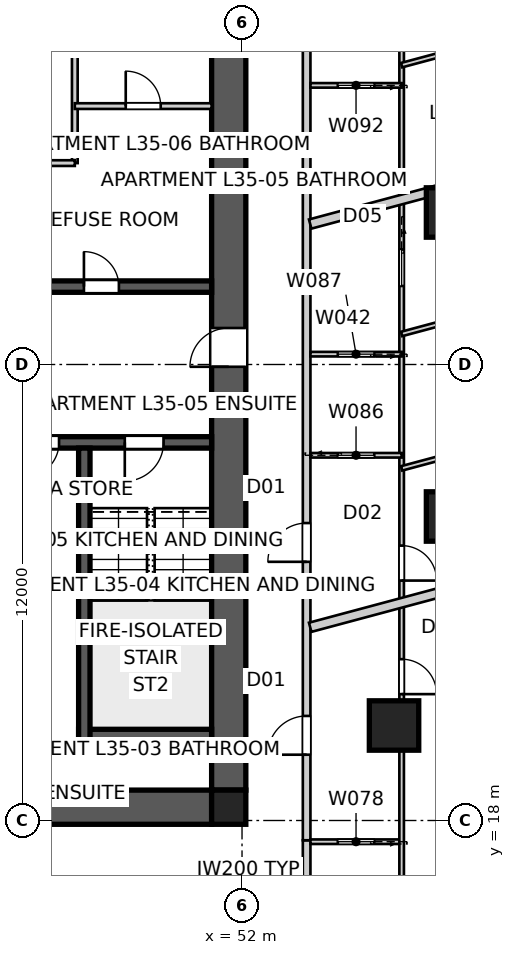
"""IFC4 building model, lengths in metres.
Left out: names, types, materials, properties, quantities, classifications, styles, units other than length and angle.
Written with IfcOpenShell. Run it as: python <this file> out.ifc"""

import sys

from ifc_helpers import new_model, si_unit, direction, frame, frame_2d, origin, origin_2d, place, context, subcontext, project, spatial, polyline, rectangle, outline, extrude, element, fill, save


model = new_model("IFC4")
c1 = context("Model", 3, precision=1e-05, world=origin(), true_north=direction((0.0, 1.0)))
c2 = subcontext(c1, "Body", "Model", "MODEL_VIEW")
j1 = project(units=[si_unit("LENGTHUNIT", "METRE"), si_unit("PLANEANGLEUNIT", "RADIAN")], contexts=[c1])
p1 = place(None, origin())
s1 = spatial("IfcSite", under=j1, at=p1, CompositionType="ELEMENT")
p2 = place(p1, origin())
s2 = spatial("IfcBuilding", under=s1, at=p2, CompositionType="ELEMENT")
p3 = place(p2, frame((0.0, 0.0, 128.6)))
s3 = spatial("IfcBuildingStorey", under=s2, at=p3, CompositionType="ELEMENT", Elevation=128.6)
p4 = place(p3, frame((51.2, 18.35, 0.0), z_axis=(0.0, 0.0, 1.0), x_axis=(-1.0, 0.0, 0.0)))
e1 = element("IfcWall", 1, at=p4, inside=s3, PredefinedType="SHEAR", context=c2, shape_type="SweptSolid", body=[
    extrude(outline(polyline([(0.0, -0.45), (22.4, -0.45), (22.4, -0.025), (22.85, -0.025), (22.85, 0.025), (22.4, 0.025), (22.4, 0.45), (0.0, 0.45), (0.0, 0.025), (-0.45, 0.025), (-0.45, -0.025), (0.0, -0.025), (0.0, -0.45)])), origin(), (0.0, 0.0, 1.0), 3.4),
])
p5 = place(p3, frame((51.65, 18.8, 0.0), z_axis=(0.0, 0.0, 1.0), x_axis=(0.0, 1.0, 0.0)))
e2 = element("IfcWall", 2, at=p5, inside=s3, PredefinedType="SHEAR", context=c2, shape_type="SweptSolid", body=[
    extrude(outline(polyline([(0.0, -0.45), (22.4, -0.45), (22.4, -0.025), (22.85, -0.025), (22.85, 0.025), (22.4, 0.025), (22.4, 0.45), (0.0, 0.45), (0.0, 0.025), (-0.45, 0.025), (-0.45, -0.025), (0.0, -0.025), (0.0, -0.45)])), origin(), (0.0, 0.0, 1.0), 3.4),
])
p6 = place(p5, frame((11.14, 0.0, 0.0)))
e3 = element("IfcOpeningElement", 3, at=p6, cuts=e2, PredefinedType="OPENING", context=c2, shape_type="SweptSolid", body=[
    extrude(rectangle(XDim=1.02, YDim=2.4, at=frame_2d((0.51, 1.2))), frame((0.0, 0.46, 0.0), z_axis=(0.0, -1.0, 0.0), x_axis=(1.0, 0.0, 0.0)), (0.0, 0.0, 1.0), 0.92),
])
p7 = place(p3, frame((28.8, 32.05, 0.0), z_axis=(0.0, 0.0, 1.0), x_axis=(1.0, 0.0, 0.0)))
e4 = element("IfcWall", 4, at=p7, inside=s3, PredefinedType="SHEAR", context=c2, shape_type="SweptSolid", body=[
    extrude(rectangle(XDim=22.4, YDim=0.3, at=frame_2d((11.2, 0.0))), origin(), (0.0, 0.0, 1.0), 3.4),
])
p8 = place(p7, frame((19.04, 0.0, 0.0)))
e5 = element("IfcOpeningElement", 5, at=p8, cuts=e4, PredefinedType="OPENING", context=c2, shape_type="SweptSolid", body=[
    extrude(rectangle(XDim=0.92, YDim=2.1, at=frame_2d((0.46, 1.05))), frame((0.0, 0.16, 0.0), z_axis=(0.0, -1.0, 0.0), x_axis=(1.0, 0.0, 0.0)), (0.0, 0.0, 1.0), 0.32),
])
p9 = place(p7, frame((1.265, 0.0, 0.0)))
e6 = element("IfcOpeningElement", 6, at=p9, cuts=e4, PredefinedType="OPENING", context=c2, shape_type="SweptSolid", body=[
    extrude(rectangle(XDim=1.02, YDim=2.1, at=frame_2d((0.51, 1.05))), frame((0.0, 0.16, 0.0), z_axis=(0.0, -1.0, 0.0), x_axis=(1.0, 0.0, 0.0)), (0.0, 0.0, 1.0), 0.32),
])
p10 = place(p7, frame((4.015, 0.0, 0.0)))
e7 = element("IfcOpeningElement", 7, at=p10, cuts=e4, PredefinedType="OPENING", context=c2, shape_type="SweptSolid", body=[
    extrude(rectangle(XDim=0.92, YDim=2.1, at=frame_2d((0.46, 1.05))), frame((0.0, 0.16, 0.0), z_axis=(0.0, -1.0, 0.0), x_axis=(1.0, 0.0, 0.0)), (0.0, 0.0, 1.0), 0.32),
])
p11 = place(p7, frame((6.45, 0.0, 0.0)))
e8 = element("IfcOpeningElement", 8, at=p11, cuts=e4, PredefinedType="OPENING", context=c2, shape_type="SweptSolid", body=[
    extrude(rectangle(XDim=1.1, YDim=2.1, at=frame_2d((0.55, 1.05))), frame((0.0, 0.16, 0.0), z_axis=(0.0, -1.0, 0.0), x_axis=(1.0, 0.0, 0.0)), (0.0, 0.0, 1.0), 0.32),
])
p12 = place(p7, frame((9.25, 0.0, 0.0)))
e9 = element("IfcOpeningElement", 9, at=p12, cuts=e4, PredefinedType="OPENING", context=c2, shape_type="SweptSolid", body=[
    extrude(rectangle(XDim=1.1, YDim=2.1, at=frame_2d((0.55, 1.05))), frame((0.0, 0.16, 0.0), z_axis=(0.0, -1.0, 0.0), x_axis=(1.0, 0.0, 0.0)), (0.0, 0.0, 1.0), 0.32),
])
p13 = place(p7, frame((14.85, 0.0, 0.0)))
e10 = element("IfcOpeningElement", 10, at=p13, cuts=e4, PredefinedType="OPENING", context=c2, shape_type="SweptSolid", body=[
    extrude(rectangle(XDim=1.1, YDim=2.1, at=frame_2d((0.55, 1.05))), frame((0.0, 0.16, 0.0), z_axis=(0.0, -1.0, 0.0), x_axis=(1.0, 0.0, 0.0)), (0.0, 0.0, 1.0), 0.32),
])
p14 = place(p3, frame((51.2, 27.95, 0.0), z_axis=(0.0, 0.0, 1.0), x_axis=(-1.0, 0.0, 0.0)))
e11 = element("IfcWall", 11, at=p14, inside=s3, PredefinedType="SHEAR", context=c2, shape_type="SweptSolid", body=[
    extrude(rectangle(XDim=22.4, YDim=0.3, at=frame_2d((11.2, 0.0))), origin(), (0.0, 0.0, 1.0), 3.4),
])
p15 = place(p14, frame((19.04, 0.0, 0.0)))
e12 = element("IfcOpeningElement", 12, at=p15, cuts=e11, PredefinedType="OPENING", context=c2, shape_type="SweptSolid", body=[
    extrude(rectangle(XDim=0.92, YDim=2.1, at=frame_2d((0.46, 1.05))), frame((0.0, 0.16, 0.0), z_axis=(0.0, -1.0, 0.0), x_axis=(1.0, 0.0, 0.0)), (0.0, 0.0, 1.0), 0.32),
])
p16 = place(p14, frame((1.265, 0.0, 0.0)))
e13 = element("IfcOpeningElement", 13, at=p16, cuts=e11, PredefinedType="OPENING", context=c2, shape_type="SweptSolid", body=[
    extrude(rectangle(XDim=1.02, YDim=2.1, at=frame_2d((0.51, 1.05))), frame((0.0, 0.16, 0.0), z_axis=(0.0, -1.0, 0.0), x_axis=(1.0, 0.0, 0.0)), (0.0, 0.0, 1.0), 0.32),
])
p17 = place(p14, frame((4.015, 0.0, 0.0)))
e14 = element("IfcOpeningElement", 14, at=p17, cuts=e11, PredefinedType="OPENING", context=c2, shape_type="SweptSolid", body=[
    extrude(rectangle(XDim=0.92, YDim=2.1, at=frame_2d((0.46, 1.05))), frame((0.0, 0.16, 0.0), z_axis=(0.0, -1.0, 0.0), x_axis=(1.0, 0.0, 0.0)), (0.0, 0.0, 1.0), 0.32),
])
p18 = place(p14, frame((14.85, 0.0, 0.0)))
e15 = element("IfcOpeningElement", 15, at=p18, cuts=e11, PredefinedType="OPENING", context=c2, shape_type="SweptSolid", body=[
    extrude(rectangle(XDim=1.1, YDim=2.1, at=frame_2d((0.55, 1.05))), frame((0.0, 0.16, 0.0), z_axis=(0.0, -1.0, 0.0), x_axis=(1.0, 0.0, 0.0)), (0.0, 0.0, 1.0), 0.32),
])
p19 = place(p3, frame((47.85, 27.8, 0.0), z_axis=(0.0, 0.0, 1.0), x_axis=(0.0, -1.0, 0.0)))
e16 = element("IfcWall", 16, at=p19, inside=s3, PredefinedType="SHEAR", context=c2, shape_type="SweptSolid", body=[
    extrude(rectangle(XDim=7.7, YDim=0.3, at=frame_2d((3.85, 0.0))), origin(), (0.0, 0.0, 1.0), 3.4),
])
p20 = place(p3, frame((51.2, 20.25, 0.0), z_axis=(0.0, 0.0, 1.0), x_axis=(-1.0, 0.0, 0.0)))
e17 = element("IfcWall", 17, at=p20, inside=s3, PredefinedType="SHEAR", context=c2, shape_type="SweptSolid", body=[
    extrude(rectangle(XDim=3.5, YDim=0.3, at=frame_2d((1.75, 0.0))), origin(), (0.0, 0.0, 1.0), 3.4),
])
p21 = place(p3, frame((51.65, 18.35, 0.0), z_axis=(0.0, 0.0, 1.0), x_axis=(1.0, 0.0, 0.0)))
e18 = element("IfcColumn", 18, at=p21, inside=s3, PredefinedType="COLUMN", context=c2, shape_type="SweptSolid", body=[
    extrude(rectangle(XDim=0.9, YDim=0.9, at=origin_2d()), origin(), (0.0, 0.0, 1.0), 3.4),
])
for number, where, z_axis, x_axis in (
    (19, (57.5, 26.0, 0.0), (0.0, 0.0, 1.0), (1.0, 0.0, 0.0)),
    (20, (57.5, 34.0, 0.0), (0.0, 0.0, 1.0), (1.0, 0.0, 0.0)),
    (21, (56.0, 20.5, 0.0), (0.0, 0.0, 1.0), (1.0, 0.0, 0.0)),
):
    element("IfcColumn", number, at=place(p3, frame(where, z_axis=z_axis, x_axis=x_axis)), inside=s3, PredefinedType="COLUMN", context=c2, shape_type="SweptSolid", body=[
        extrude(rectangle(XDim=1.3, YDim=1.3, at=origin_2d()), origin(), (0.0, 0.0, 1.0), 3.4),
    ])
p22 = place(p3, frame((53.7, 15.926, 0.0), z_axis=(0.0, 0.0, 1.0), x_axis=(0.0, 1.0, 0.0)))
e22 = element("IfcWall", 22, at=p22, inside=s3, PredefinedType="PARTITIONING", context=c2, shape_type="SweptSolid", body=[
    extrude(rectangle(XDim=1.554, YDim=0.2, at=frame_2d((0.777, 0.0))), origin(), (0.0, 0.0, 1.0), 2.722),
])
p23 = place(p3, frame((53.7, 17.48, 0.0), z_axis=(0.0, 0.0, 1.0), x_axis=(0.0, 1.0, 0.0)))
e23 = element("IfcWall", 23, at=p23, inside=s3, PredefinedType="PARTITIONING", context=c2, shape_type="SweptSolid", body=[
    extrude(rectangle(XDim=26.22, YDim=0.2, at=frame_2d((13.11, 0.0))), origin(), (0.0, 0.0, 1.0), 3.25),
])
p24 = place(p23, frame((2.252, 0.0, 0.0)))
e24 = element("IfcOpeningElement", 24, at=p24, cuts=e23, PredefinedType="OPENING", context=c2, shape_type="SweptSolid", body=[
    extrude(rectangle(XDim=1.02, YDim=2.34, at=frame_2d((0.51, 1.17))), frame((0.0, 0.11, 0.0), z_axis=(0.0, -1.0, 0.0), x_axis=(1.0, 0.0, 0.0)), (0.0, 0.0, 1.0), 0.22),
])
p25 = place(p23, frame((7.328, 0.0, 0.0)))
e25 = element("IfcOpeningElement", 25, at=p25, cuts=e23, PredefinedType="OPENING", context=c2, shape_type="SweptSolid", body=[
    extrude(rectangle(XDim=1.02, YDim=2.34, at=frame_2d((0.51, 1.17))), frame((0.0, 0.11, 0.0), z_axis=(0.0, -1.0, 0.0), x_axis=(1.0, 0.0, 0.0)), (0.0, 0.0, 1.0), 0.22),
])
p26 = place(p3, frame((63.665, 36.341, 0.0), z_axis=(0.0, 0.0, 1.0), x_axis=(-0.965927365002, -0.258813302479, 0.0)))
e26 = element("IfcWall", 26, at=p26, inside=s3, PredefinedType="PARTITIONING", context=c2, shape_type="SweptSolid", body=[
    extrude(rectangle(XDim=10.22, YDim=0.25, at=frame_2d((5.11, 0.0))), origin(), (0.0, 0.0, 1.0), 3.25),
])
p27 = place(p3, frame((66.318, 26.44, 0.0), z_axis=(0.0, 0.0, 1.0), x_axis=(-0.965924854576, -0.258822671559, 0.0)))
e27 = element("IfcWall", 27, at=p27, inside=s3, PredefinedType="PARTITIONING", context=c2, shape_type="SweptSolid", body=[
    extrude(rectangle(XDim=12.966, YDim=0.25, at=frame_2d((6.483, 0.0))), origin(), (0.0, 0.0, 1.0), 3.25),
])
p28 = place(p3, frame((47.6, 41.2, 0.0), z_axis=(0.0, 0.0, 1.0), x_axis=(0.0, -1.0, 0.0)))
e28 = element("IfcWall", 28, at=p28, inside=s3, PredefinedType="SOLIDWALL", context=c2, shape_type="SweptSolid", body=[
    extrude(rectangle(XDim=5.9, YDim=0.15, at=frame_2d((2.95, 0.0))), origin(), (0.0, 0.0, 1.0), 3.25),
])
p29 = place(p3, frame((47.6, 35.3, 0.0), z_axis=(0.0, 0.0, 1.0), x_axis=(-1.0, 0.0, 0.0)))
e29 = element("IfcWall", 29, at=p29, inside=s3, PredefinedType="SOLIDWALL", context=c2, shape_type="SweptSolid", body=[
    extrude(rectangle(XDim=1.85, YDim=0.15, at=frame_2d((0.925, 0.0))), origin(), (0.0, 0.0, 1.0), 3.25),
])
p30 = place(p3, frame((47.6, 36.8, 0.0), z_axis=(0.0, 0.0, 1.0), x_axis=(1.0, 0.0, 0.0)))
e30 = element("IfcWall", 30, at=p30, inside=s3, PredefinedType="SOLIDWALL", context=c2, shape_type="SweptSolid", body=[
    extrude(rectangle(XDim=3.6, YDim=0.15, at=frame_2d((1.8, 0.0))), origin(), (0.0, 0.0, 1.0), 3.25),
])
p31 = place(p30, frame((1.34, 0.0, 0.0)))
e31 = element("IfcOpeningElement", 31, at=p31, cuts=e30, PredefinedType="OPENING", context=c2, shape_type="SweptSolid", body=[
    extrude(rectangle(XDim=0.92, YDim=2.1, at=frame_2d((0.46, 1.05))), frame((0.0, 0.085, 0.0), z_axis=(0.0, -1.0, 0.0), x_axis=(1.0, 0.0, 0.0)), (0.0, 0.0, 1.0), 0.17),
])
p32 = place(p3, frame((56.2, 17.442, 0.0), z_axis=(0.0, 0.0, 1.0), x_axis=(-1.0, 0.0, 0.0)))
e32 = element("IfcWall", 32, at=p32, inside=s3, PredefinedType="PARTITIONING", context=c2, shape_type="SweptSolid", body=[
    extrude(rectangle(XDim=2.4, YDim=0.12, at=frame_2d((1.2, 0.0))), origin(), (0.0, 0.0, 1.0), 3.25),
])
p33 = place(p32, frame((0.72, 0.0, 0.0)))
e33 = element("IfcOpeningElement", 33, at=p33, cuts=e32, PredefinedType="OPENING", context=c2, shape_type="SweptSolid", body=[
    extrude(rectangle(XDim=0.96, YDim=2.1, at=frame_2d((0.48, 1.05))), frame((0.0, 0.07, 0.0), z_axis=(0.0, -1.0, 0.0), x_axis=(1.0, 0.0, 0.0)), (0.0, 0.0, 1.0), 0.14),
])
p34 = place(p3, frame((56.2, 46.2, 0.0), z_axis=(0.0, 0.0, 1.0), x_axis=(0.0, -1.0, 0.0)))
e34 = element("IfcWall", 34, at=p34, inside=s3, PredefinedType="PARTITIONING", context=c2, shape_type="SweptSolid", body=[
    extrude(rectangle(XDim=33.2, YDim=0.12, at=frame_2d((16.6, 0.0))), origin(), (0.0, 0.0, 1.0), 2.55),
])
p35 = place(p34, frame((23.955, 0.0, 0.0)))
e35 = element("IfcOpeningElement", 35, at=p35, cuts=e34, PredefinedType="OPENING", context=c2, shape_type="SweptSolid", body=[
    extrude(rectangle(XDim=0.92, YDim=2.34, at=frame_2d((0.46, 1.17))), frame((0.0, 0.07, 0.0), z_axis=(0.0, -1.0, 0.0), x_axis=(1.0, 0.0, 0.0)), (0.0, 0.0, 1.0), 0.14),
])
p36 = place(p34, frame((20.966, 0.0, 0.0)))
e36 = element("IfcOpeningElement", 36, at=p36, cuts=e34, PredefinedType="OPENING", context=c2, shape_type="SweptSolid", body=[
    extrude(rectangle(XDim=0.92, YDim=2.34, at=frame_2d((0.46, 1.17))), frame((0.0, 0.07, 0.0), z_axis=(0.0, -1.0, 0.0), x_axis=(1.0, 0.0, 0.0)), (0.0, 0.0, 1.0), 0.14),
])
p37 = place(p34, frame((13.174, 0.0, 0.0)))
e37 = element("IfcOpeningElement", 37, at=p37, cuts=e34, PredefinedType="OPENING", context=c2, shape_type="SweptSolid", body=[
    extrude(rectangle(XDim=0.96, YDim=2.1, at=frame_2d((0.48, 1.05))), frame((0.0, 0.07, 0.0), z_axis=(0.0, -1.0, 0.0), x_axis=(1.0, 0.0, 0.0)), (0.0, 0.0, 1.0), 0.14),
])
p38 = place(p3, frame((53.8, 27.611, 0.0), z_axis=(0.0, 0.0, 1.0), x_axis=(1.0, 0.0, 0.0)))
e38 = element("IfcWall", 38, at=p38, inside=s3, PredefinedType="PARTITIONING", context=c2, shape_type="SweptSolid", body=[
    extrude(rectangle(XDim=2.4, YDim=0.12, at=frame_2d((1.2, 0.0))), origin(), (0.0, 0.0, 1.0), 3.25),
])
p39 = place(p38, frame((0.72, 0.0, 0.0)))
e39 = element("IfcOpeningElement", 39, at=p39, cuts=e38, PredefinedType="OPENING", context=c2, shape_type="SweptSolid", body=[
    extrude(rectangle(XDim=0.96, YDim=2.1, at=frame_2d((0.48, 1.05))), frame((0.0, 0.07, 0.0), z_axis=(0.0, -1.0, 0.0), x_axis=(1.0, 0.0, 0.0)), (0.0, 0.0, 1.0), 0.14),
])
p40 = place(p3, frame((56.2, 30.272, 0.0), z_axis=(0.0, 0.0, 1.0), x_axis=(-1.0, 0.0, 0.0)))
e40 = element("IfcWall", 40, at=p40, inside=s3, PredefinedType="PARTITIONING", context=c2, shape_type="SweptSolid", body=[
    extrude(rectangle(XDim=2.4, YDim=0.12, at=frame_2d((1.2, 0.0))), origin(), (0.0, 0.0, 1.0), 3.25),
])
p41 = place(p40, frame((0.72, 0.0, 0.0)))
e41 = element("IfcOpeningElement", 41, at=p41, cuts=e40, PredefinedType="OPENING", context=c2, shape_type="SweptSolid", body=[
    extrude(rectangle(XDim=0.96, YDim=2.1, at=frame_2d((0.48, 1.05))), frame((0.0, 0.07, 0.0), z_axis=(0.0, -1.0, 0.0), x_axis=(1.0, 0.0, 0.0)), (0.0, 0.0, 1.0), 0.14),
])
p42 = place(p3, frame((56.2, 27.266, 0.0), z_axis=(0.0, 0.0, 1.0), x_axis=(0.965926072385, 0.25881812666, 0.0)))
e42 = element("IfcWall", 42, at=p42, inside=s3, PredefinedType="PARTITIONING", context=c2, shape_type="SweptSolid", body=[
    extrude(rectangle(XDim=9.52, YDim=0.12, at=frame_2d((4.76, 0.0))), origin(), (0.0, 0.0, 1.0), 3.25),
])
p43 = place(p42, frame((4.32, 0.0, 0.0)))
e43 = element("IfcOpeningElement", 43, at=p43, cuts=e42, PredefinedType="OPENING", context=c2, shape_type="SweptSolid", body=[
    extrude(rectangle(XDim=0.92, YDim=2.34, at=frame_2d((0.46, 1.17))), frame((0.0, 0.07, 0.0), z_axis=(0.0, -1.0, 0.0), x_axis=(1.0, 0.0, 0.0)), (0.0, 0.0, 1.0), 0.14),
])
p44 = place(p3, frame((56.2, 30.803, 0.0), z_axis=(0.0, 0.0, 1.0), x_axis=(0.965920565748, 0.258838676912, 0.0)))
e44 = element("IfcWall", 44, at=p44, inside=s3, PredefinedType="PARTITIONING", context=c2, shape_type="SweptSolid", body=[
    extrude(rectangle(XDim=8.604, YDim=0.12, at=frame_2d((4.302, 0.0))), origin(), (0.0, 0.0, 1.0), 3.25),
])
p45 = place(p3, frame((56.2, 37.345, 0.0), z_axis=(0.0, 0.0, 1.0), x_axis=(-1.0, 0.0, 0.0)))
e45 = element("IfcWall", 45, at=p45, inside=s3, PredefinedType="PARTITIONING", context=c2, shape_type="SweptSolid", body=[
    extrude(rectangle(XDim=2.4, YDim=0.12, at=frame_2d((1.2, 0.0))), origin(), (0.0, 0.0, 1.0), 3.25),
])
p46 = place(p45, frame((0.72, 0.0, 0.0)))
e46 = element("IfcOpeningElement", 46, at=p46, cuts=e45, PredefinedType="OPENING", context=c2, shape_type="SweptSolid", body=[
    extrude(rectangle(XDim=0.96, YDim=2.1, at=frame_2d((0.48, 1.05))), frame((0.0, 0.07, 0.0), z_axis=(0.0, -1.0, 0.0), x_axis=(1.0, 0.0, 0.0)), (0.0, 0.0, 1.0), 0.14),
])
p47 = place(p3, frame((56.2, 37.878, 0.0), z_axis=(0.0, 0.0, 1.0), x_axis=(0.96591892777, 0.258844789354, 0.0)))
e47 = element("IfcWall", 47, at=p47, inside=s3, PredefinedType="PARTITIONING", context=c2, shape_type="SweptSolid", body=[
    extrude(rectangle(XDim=6.773, YDim=0.12, at=frame_2d((3.386, 0.0))), origin(), (0.0, 0.0, 1.0), 3.25),
])
p48 = place(p47, frame((2.947, 0.0, 0.0)))
e48 = element("IfcOpeningElement", 48, at=p48, cuts=e47, PredefinedType="OPENING", context=c2, shape_type="SweptSolid", body=[
    extrude(rectangle(XDim=0.92, YDim=2.34, at=frame_2d((0.46, 1.17))), frame((0.0, 0.07, 0.0), z_axis=(0.0, -1.0, 0.0), x_axis=(1.0, 0.0, 0.0)), (0.0, 0.0, 1.0), 0.14),
])
p49 = place(p8, origin())
e49 = element("IfcDoor", 49, at=p49, inside=s3, OperationType="SINGLE_SWING_LEFT", PredefinedType="DOOR", context=c2, shape_type="SweptSolid", body=[
    extrude(rectangle(XDim=0.92, YDim=2.1, at=frame_2d((0.46, 1.05))), frame((0.0, 0.025, 0.0), z_axis=(0.0, -1.0, 0.0), x_axis=(1.0, 0.0, 0.0)), (0.0, 0.0, 1.0), 0.05),
])
fill(e5, e49)
p50 = place(p16, origin())
e50 = element("IfcDoor", 50, at=p50, inside=s3, OperationType="SINGLE_SWING_RIGHT", PredefinedType="DOOR", context=c2, shape_type="SweptSolid", body=[
    extrude(rectangle(XDim=1.02, YDim=2.1, at=frame_2d((0.51, 1.05))), frame((0.0, 0.025, 0.0), z_axis=(0.0, -1.0, 0.0), x_axis=(1.0, 0.0, 0.0)), (0.0, 0.0, 1.0), 0.05),
])
fill(e13, e50)
p51 = place(p17, origin())
e51 = element("IfcDoor", 51, at=p51, inside=s3, OperationType="SINGLE_SWING_RIGHT", PredefinedType="DOOR", context=c2, shape_type="SweptSolid", body=[
    extrude(rectangle(XDim=0.92, YDim=2.1, at=frame_2d((0.46, 1.05))), frame((0.0, 0.025, 0.0), z_axis=(0.0, -1.0, 0.0), x_axis=(1.0, 0.0, 0.0)), (0.0, 0.0, 1.0), 0.05),
])
fill(e14, e51)
p52 = place(p24, origin())
e52 = element("IfcDoor", 52, at=p52, inside=s3, OperationType="SINGLE_SWING_LEFT", PredefinedType="DOOR", context=c2, shape_type="SweptSolid", body=[
    extrude(rectangle(XDim=1.02, YDim=2.34, at=frame_2d((0.51, 1.17))), frame((0.0, 0.025, 0.0), z_axis=(0.0, -1.0, 0.0), x_axis=(1.0, 0.0, 0.0)), (0.0, 0.0, 1.0), 0.05),
])
fill(e24, e52)
p53 = place(p25, origin())
e53 = element("IfcDoor", 53, at=p53, inside=s3, OperationType="SINGLE_SWING_LEFT", PredefinedType="DOOR", context=c2, shape_type="SweptSolid", body=[
    extrude(rectangle(XDim=1.02, YDim=2.34, at=frame_2d((0.51, 1.17))), frame((0.0, 0.025, 0.0), z_axis=(0.0, -1.0, 0.0), x_axis=(1.0, 0.0, 0.0)), (0.0, 0.0, 1.0), 0.05),
])
fill(e25, e53)
p54 = place(p31, origin())
e54 = element("IfcDoor", 54, at=p54, inside=s3, OperationType="SINGLE_SWING_LEFT", PredefinedType="DOOR", context=c2, shape_type="SweptSolid", body=[
    extrude(rectangle(XDim=0.92, YDim=2.1, at=frame_2d((0.46, 1.05))), frame((0.0, 0.025, 0.0), z_axis=(0.0, -1.0, 0.0), x_axis=(1.0, 0.0, 0.0)), (0.0, 0.0, 1.0), 0.05),
])
fill(e31, e54)
p55 = place(p35, origin())
e55 = element("IfcDoor", 55, at=p55, inside=s3, OperationType="SINGLE_SWING_RIGHT", PredefinedType="DOOR", context=c2, shape_type="SweptSolid", body=[
    extrude(rectangle(XDim=0.92, YDim=2.34, at=frame_2d((0.46, 1.17))), frame((0.0, 0.025, 0.0), z_axis=(0.0, -1.0, 0.0), x_axis=(1.0, 0.0, 0.0)), (0.0, 0.0, 1.0), 0.05),
])
fill(e35, e55)
p56 = place(p33, origin())
e56 = element("IfcDoor", 56, at=p56, inside=s3, OperationType="SLIDING_TO_LEFT", PredefinedType="DOOR", context=c2, shape_type="SweptSolid", body=[
    extrude(rectangle(XDim=0.96, YDim=2.1, at=frame_2d((0.48, 1.05))), frame((0.0, 0.025, 0.0), z_axis=(0.0, -1.0, 0.0), x_axis=(1.0, 0.0, 0.0)), (0.0, 0.0, 1.0), 0.05),
])
fill(e33, e56)
p57 = place(p36, origin())
e57 = element("IfcDoor", 57, at=p57, inside=s3, OperationType="SINGLE_SWING_RIGHT", PredefinedType="DOOR", context=c2, shape_type="SweptSolid", body=[
    extrude(rectangle(XDim=0.92, YDim=2.34, at=frame_2d((0.46, 1.17))), frame((0.0, 0.025, 0.0), z_axis=(0.0, -1.0, 0.0), x_axis=(1.0, 0.0, 0.0)), (0.0, 0.0, 1.0), 0.05),
])
fill(e36, e57)
p58 = place(p39, origin())
e58 = element("IfcDoor", 58, at=p58, inside=s3, OperationType="SLIDING_TO_LEFT", PredefinedType="DOOR", context=c2, shape_type="SweptSolid", body=[
    extrude(rectangle(XDim=0.96, YDim=2.1, at=frame_2d((0.48, 1.05))), frame((0.0, 0.025, 0.0), z_axis=(0.0, -1.0, 0.0), x_axis=(1.0, 0.0, 0.0)), (0.0, 0.0, 1.0), 0.05),
])
fill(e39, e58)
p59 = place(p46, origin())
e59 = element("IfcDoor", 59, at=p59, inside=s3, OperationType="SLIDING_TO_LEFT", PredefinedType="DOOR", context=c2, shape_type="SweptSolid", body=[
    extrude(rectangle(XDim=0.96, YDim=2.1, at=frame_2d((0.48, 1.05))), frame((0.0, 0.025, 0.0), z_axis=(0.0, -1.0, 0.0), x_axis=(1.0, 0.0, 0.0)), (0.0, 0.0, 1.0), 0.05),
])
fill(e46, e59)
p60 = place(p41, origin())
e60 = element("IfcDoor", 60, at=p60, inside=s3, OperationType="SLIDING_TO_LEFT", PredefinedType="DOOR", context=c2, shape_type="SweptSolid", body=[
    extrude(rectangle(XDim=0.96, YDim=2.1, at=frame_2d((0.48, 1.05))), frame((0.0, 0.025, 0.0), z_axis=(0.0, -1.0, 0.0), x_axis=(1.0, 0.0, 0.0)), (0.0, 0.0, 1.0), 0.05),
])
fill(e41, e60)
p61 = place(p37, origin())
e61 = element("IfcDoor", 61, at=p61, inside=s3, OperationType="SLIDING_TO_LEFT", PredefinedType="DOOR", context=c2, shape_type="SweptSolid", body=[
    extrude(rectangle(XDim=0.96, YDim=2.1, at=frame_2d((0.48, 1.05))), frame((0.0, 0.025, 0.0), z_axis=(0.0, -1.0, 0.0), x_axis=(1.0, 0.0, 0.0)), (0.0, 0.0, 1.0), 0.05),
])
fill(e37, e61)
p62 = place(p6, origin())
e62 = element("IfcDoor", 62, at=p62, inside=s3, OperationType="SINGLE_SWING_LEFT", PredefinedType="DOOR", context=c2, shape_type="SweptSolid", body=[
    extrude(rectangle(XDim=1.02, YDim=2.4, at=frame_2d((0.51, 1.2))), frame((0.0, 0.025, 0.0), z_axis=(0.0, -1.0, 0.0), x_axis=(1.0, 0.0, 0.0)), (0.0, 0.0, 1.0), 0.05),
])
fill(e3, e62)
save(model, sys.argv[1])
